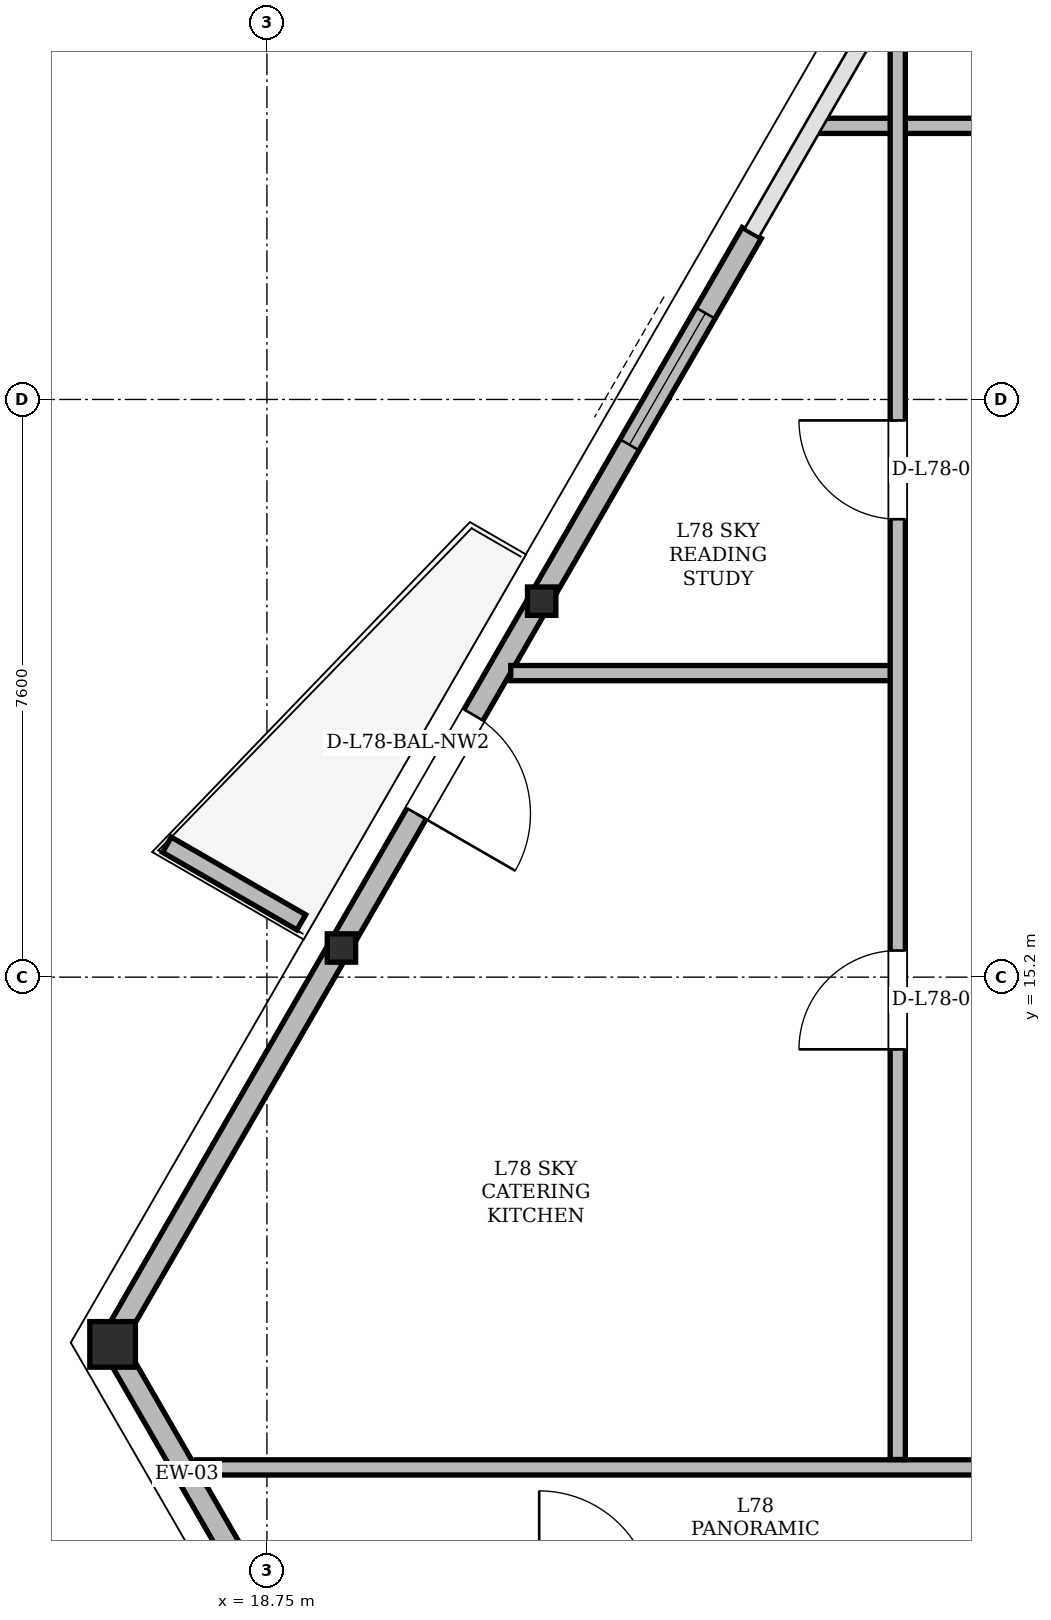
"""IFC4 building model, lengths in metres.
Left out: names, types, materials, properties, quantities, classifications, styles, units other than length and angle.
Written with IfcOpenShell. Run it as: python <this file> out.ifc"""

import sys

from ifc_helpers import new_model, si_unit, direction, frame, frame_2d, origin, origin_2d, place, context, subcontext, project, spatial, polyline, rectangle, hollow_rectangle, i_section, outline, extrude, element, fill, save


model = new_model("IFC4")
c1 = context("Model", 3, precision=1e-05, world=origin(), true_north=direction((0.0, 1.0)))
c2 = subcontext(c1, "Body", "Model", "MODEL_VIEW")
j1 = project(units=[si_unit("LENGTHUNIT", "METRE"), si_unit("PLANEANGLEUNIT", "RADIAN")], contexts=[c1])
p1 = place(None, origin())
s1 = spatial("IfcSite", under=j1, at=p1, CompositionType="ELEMENT")
p2 = place(p1, origin())
s2 = spatial("IfcBuilding", under=s1, at=p2, CompositionType="ELEMENT")
p3 = place(p2, frame((0.0, 0.0, 296.7)))
s3 = spatial("IfcBuildingStorey", under=s2, at=p3, CompositionType="ELEMENT", Elevation=296.7)
p4 = place(p3, frame((16.701, 10.392, 0.005), z_axis=(0.008479798561, -0.010436675152, 0.999909580326), x_axis=(0.776114000116, 0.630592625094, 0.0)))
e1 = element("IfcColumn", 1, at=p4, inside=s3, PredefinedType="COLUMN", context=c2, shape_type="SweptSolid", body=[
    extrude(hollow_rectangle(XDim=0.6, YDim=0.6, WallThickness=0.045, at=origin_2d()), origin(), (0.0, 0.0, 1.0), 4.491),
])
p5 = place(p3, frame((22.343, 20.164, 0.005), z_axis=(0.009893197126, -0.007936300991, 0.999919566654), x_axis=(0.625739826637, 0.780031838684, 0.0)))
e2 = element("IfcColumn", 2, at=p5, inside=s3, PredefinedType="COLUMN", context=c2, shape_type="SweptSolid", body=[
    extrude(i_section(OverallWidth=0.373, OverallDepth=0.373, WebThickness=0.016, FlangeThickness=0.026, at=origin_2d()), origin(), (0.0, 0.0, 1.0), 4.491),
])
p6 = place(p3, frame((19.71, 15.604, 0.005), z_axis=(0.009186508362, -0.009132150324, 0.999916102428), x_axis=(0.705005437623, 0.709201898561, 0.0)))
e3 = element("IfcColumn", 3, at=p6, inside=s3, PredefinedType="COLUMN", context=c2, shape_type="SweptSolid", body=[
    extrude(i_section(OverallWidth=0.373, OverallDepth=0.373, WebThickness=0.016, FlangeThickness=0.026, at=origin_2d()), origin(), (0.0, 0.0, 1.0), 4.491),
])
p7 = place(p3, frame((16.701, 10.392, 0.0), z_axis=(0.0, 0.0, 1.0), x_axis=(0.500014184414, -0.866017214255, 0.0)))
e4 = element("IfcWall", 4, at=p7, inside=s3, PredefinedType="SOLIDWALL", context=c2, shape_type="SweptSolid", body=[
    extrude(rectangle(XDim=3.984, YDim=0.29, at=frame_2d((1.992, 0.0))), origin(), (0.0, 0.0, 1.0), 3.658),
])
p8 = place(p3, frame((25.129, 24.99, 0.0), z_axis=(0.0, 0.0, 1.0), x_axis=(-0.500008291124, -0.866020616849, 0.0)))
e5 = element("IfcWall", 5, at=p8, inside=s3, PredefinedType="SOLIDWALL", context=c2, shape_type="SweptSolid", body=[
    extrude(rectangle(XDim=16.857, YDim=0.29, at=frame_2d((8.429, 0.0))), origin(), (0.0, 0.0, 1.0), 3.658),
])
p9 = place(p8, frame((7.323, 0.0, 0.0)))
e6 = element("IfcOpeningElement", 6, at=p9, cuts=e5, PredefinedType="OPENING", context=c2, shape_type="SweptSolid", body=[
    extrude(rectangle(XDim=1.5, YDim=2.2, at=frame_2d((0.75, 1.1))), frame((0.0, 0.145, 0.0), z_axis=(0.0, -1.0, 0.0), x_axis=(1.0, 0.0, 0.0)), (0.0, 0.0, 1.0), 0.29),
])
p10 = place(p8, frame((1.218, 0.0, 0.85)))
e7 = element("IfcOpeningElement", 7, at=p10, cuts=e5, PredefinedType="OPENING", context=c2, shape_type="SweptSolid", body=[
    extrude(rectangle(XDim=2.0, YDim=1.8, at=frame_2d((1.0, 0.9))), frame((0.0, 0.145, 0.0), z_axis=(0.0, -1.0, 0.0), x_axis=(1.0, 0.0, 0.0)), (0.0, 0.0, 1.0), 0.29),
])
p11 = place(p3, frame((19.203, 15.921, 0.0), z_axis=(0.0, 0.0, 1.0), x_axis=(-0.866042246008, 0.499970827278, 0.0)))
e8 = element("IfcWall", 8, at=p11, inside=s3, PredefinedType="PARAPET", context=c2, shape_type="SweptSolid", body=[
    extrude(outline(polyline([(0.0, 0.0), (2.042, 0.0), (2.042, 1.1), (0.0, 1.32), (0.0, 0.0)])), frame((0.0, 0.115, 0.0), z_axis=(0.0, -1.0, 0.0), x_axis=(1.0, 0.0, 0.0)), (0.0, 0.0, 1.0), 0.23),
])
p12 = place(p3, frame((17.821, 8.75, 0.0), z_axis=(0.0, 0.0, 1.0), x_axis=(1.0, 0.0, 0.0)))
e9 = element("IfcWall", 9, at=p12, inside=s3, PredefinedType="PARTITIONING", context=c2, shape_type="SweptSolid", body=[
    extrude(rectangle(XDim=39.358, YDim=0.2, at=frame_2d((19.679, 0.0))), origin(), (0.0, 0.0, 1.0), 3.866),
])
p13 = place(p12, frame((13.555, 0.0, 0.0)))
e10 = element("IfcOpeningElement", 10, at=p13, cuts=e9, PredefinedType="OPENING", context=c2, shape_type="SweptSolid", body=[
    extrude(rectangle(XDim=1.3, YDim=2.2, at=frame_2d((0.65, 1.1))), frame((0.0, 0.1, 0.0), z_axis=(0.0, -1.0, 0.0), x_axis=(1.0, 0.0, 0.0)), (0.0, 0.0, 1.0), 0.2),
])
p14 = place(p12, frame((23.804, 0.0, 0.0)))
e11 = element("IfcOpeningElement", 11, at=p14, cuts=e9, PredefinedType="OPENING", context=c2, shape_type="SweptSolid", body=[
    extrude(rectangle(XDim=1.3, YDim=2.2, at=frame_2d((0.65, 1.1))), frame((0.0, 0.1, 0.0), z_axis=(0.0, -1.0, 0.0), x_axis=(1.0, 0.0, 0.0)), (0.0, 0.0, 1.0), 0.2),
])
p15 = place(p3, frame((21.958, 19.2, 0.0), z_axis=(0.0, 0.0, 1.0), x_axis=(1.0, 0.0, 0.0)))
e12 = element("IfcWall", 12, at=p15, inside=s3, PredefinedType="PARTITIONING", context=c2, shape_type="SweptSolid", body=[
    extrude(rectangle(XDim=5.092, YDim=0.2, at=frame_2d((2.546, 0.0))), origin(), (0.0, 0.0, 1.0), 4.28),
])
p16 = place(p3, frame((26.007, 26.4, 0.0), z_axis=(0.0, 0.0, 1.0), x_axis=(1.0, 0.0, 0.0)))
e13 = element("IfcWall", 13, at=p16, inside=s3, PredefinedType="PARTITIONING", context=c2, shape_type="SweptSolid", body=[
    extrude(rectangle(XDim=22.987, YDim=0.2, at=frame_2d((11.493, 0.0))), origin(), (0.0, 0.0, 1.0), 3.658),
])
p17 = place(p16, frame((3.132, 0.0, 0.0)))
e14 = element("IfcOpeningElement", 14, at=p17, cuts=e13, PredefinedType="OPENING", context=c2, shape_type="SweptSolid", body=[
    extrude(rectangle(XDim=0.88, YDim=2.08, at=frame_2d((0.44, 1.04))), frame((0.0, 0.1, 0.0), z_axis=(0.0, -1.0, 0.0), x_axis=(1.0, 0.0, 0.0)), (0.0, 0.0, 1.0), 0.2),
])
p18 = place(p16, frame((11.342, 0.0, 0.0)))
e15 = element("IfcOpeningElement", 15, at=p18, cuts=e13, PredefinedType="OPENING", context=c2, shape_type="SweptSolid", body=[
    extrude(rectangle(XDim=1.3, YDim=2.2, at=frame_2d((0.65, 1.1))), frame((0.0, 0.1, 0.0), z_axis=(0.0, -1.0, 0.0), x_axis=(1.0, 0.0, 0.0)), (0.0, 0.0, 1.0), 0.2),
])
p19 = place(p16, frame((19.252, 0.0, 0.0)))
e16 = element("IfcOpeningElement", 16, at=p19, cuts=e13, PredefinedType="OPENING", context=c2, shape_type="SweptSolid", body=[
    extrude(rectangle(XDim=0.88, YDim=2.08, at=frame_2d((0.44, 1.04))), frame((0.0, 0.1, 0.0), z_axis=(0.0, -1.0, 0.0), x_axis=(1.0, 0.0, 0.0)), (0.0, 0.0, 1.0), 0.2),
])
p20 = place(p3, frame((27.05, 8.854, 0.0), z_axis=(0.0, 0.0, 1.0), x_axis=(0.0, 1.0, 0.0)))
e17 = element("IfcWall", 17, at=p20, inside=s3, PredefinedType="PARTITIONING", context=c2, shape_type="SweptSolid", body=[
    extrude(rectangle(XDim=19.303, YDim=0.2, at=frame_2d((9.652, 0.0))), origin(), (0.0, 0.0, 1.0), 3.658),
])
p21 = place(p20, frame((5.396, 0.0, 0.0)))
e18 = element("IfcOpeningElement", 18, at=p21, cuts=e17, PredefinedType="OPENING", context=c2, shape_type="SweptSolid", body=[
    extrude(rectangle(XDim=1.3, YDim=2.2, at=frame_2d((0.65, 1.1))), frame((0.0, 0.1, 0.0), z_axis=(0.0, -1.0, 0.0), x_axis=(1.0, 0.0, 0.0)), (0.0, 0.0, 1.0), 0.2),
])
p22 = place(p20, frame((12.371, 0.0, 0.0)))
e19 = element("IfcOpeningElement", 19, at=p22, cuts=e17, PredefinedType="OPENING", context=c2, shape_type="SweptSolid", body=[
    extrude(rectangle(XDim=1.3, YDim=2.2, at=frame_2d((0.65, 1.1))), frame((0.0, 0.1, 0.0), z_axis=(0.0, -1.0, 0.0), x_axis=(1.0, 0.0, 0.0)), (0.0, 0.0, 1.0), 0.2),
])
p23 = place(p9, origin())
e20 = element("IfcDoor", 20, at=p23, inside=s3, OperationType="SINGLE_SWING_RIGHT", PredefinedType="DOOR", context=c2, shape_type="SweptSolid", body=[
    extrude(rectangle(XDim=1.5, YDim=2.2, at=frame_2d((0.75, 1.1))), frame((0.0, 0.025, 0.0), z_axis=(0.0, -1.0, 0.0), x_axis=(1.0, 0.0, 0.0)), (0.0, 0.0, 1.0), 0.05),
])
fill(e6, e20)
p24 = place(p10, origin())
e21 = element("IfcWindow", 21, at=p24, inside=s3, PartitioningType="SINGLE_PANEL", PredefinedType="WINDOW", context=c2, shape_type="SweptSolid", body=[
    extrude(rectangle(XDim=2.0, YDim=1.8, at=frame_2d((1.0, 0.9))), frame((0.0, 0.03, 0.0), z_axis=(0.0, -1.0, 0.0), x_axis=(1.0, 0.0, 0.0)), (0.0, 0.0, 1.0), 0.06),
])
fill(e7, e21)
p25 = place(p21, origin())
e22 = element("IfcDoor", 22, at=p25, inside=s3, OperationType="SINGLE_SWING_LEFT", PredefinedType="DOOR", context=c2, shape_type="SweptSolid", body=[
    extrude(rectangle(XDim=1.3, YDim=2.2, at=frame_2d((0.65, 1.1))), frame((0.0, 0.025, 0.0), z_axis=(0.0, -1.0, 0.0), x_axis=(1.0, 0.0, 0.0)), (0.0, 0.0, 1.0), 0.05),
])
fill(e18, e22)
p26 = place(p22, origin())
e23 = element("IfcDoor", 23, at=p26, inside=s3, OperationType="SINGLE_SWING_RIGHT", PredefinedType="DOOR", context=c2, shape_type="SweptSolid", body=[
    extrude(rectangle(XDim=1.3, YDim=2.2, at=frame_2d((0.65, 1.1))), frame((0.0, 0.025, 0.0), z_axis=(0.0, -1.0, 0.0), x_axis=(1.0, 0.0, 0.0)), (0.0, 0.0, 1.0), 0.05),
])
fill(e19, e23)
save(model, sys.argv[1])
